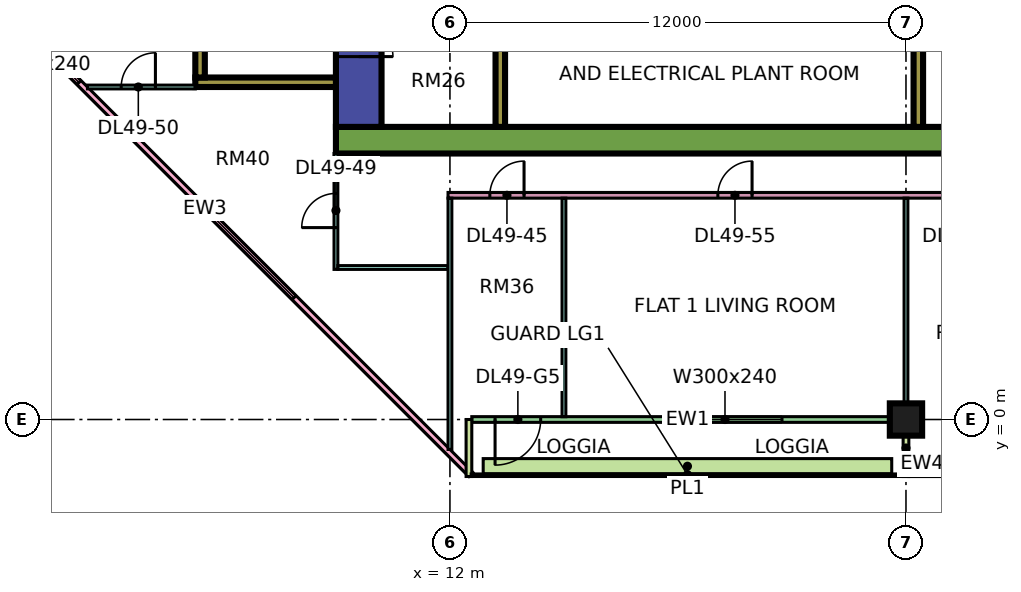
"""IFC4 building model, lengths in metres.
Left out: names, types, materials, properties, quantities, classifications, styles, units other than length and angle.
Written with IfcOpenShell. Run it as: python <this file> out.ifc"""

import sys

from ifc_helpers import new_model, si_unit, direction, frame, frame_2d, origin, origin_2d, place, context, subcontext, project, spatial, rectangle, extrude, element, fill, save


model = new_model("IFC4")
c1 = context("Model", 3, precision=1e-05, world=origin(), true_north=direction((0.0, 1.0)))
c2 = subcontext(c1, "Body", "Model", "MODEL_VIEW")
j1 = project(units=[si_unit("LENGTHUNIT", "METRE"), si_unit("PLANEANGLEUNIT", "RADIAN")], contexts=[c1])
p1 = place(None, origin())
s1 = spatial("IfcSite", under=j1, at=p1, CompositionType="ELEMENT")
p2 = place(p1, origin())
s2 = spatial("IfcBuilding", under=s1, at=p2, CompositionType="ELEMENT")
p3 = place(p2, frame((0.0, 0.0, 211.65)))
s3 = spatial("IfcBuildingStorey", under=s2, at=p3, CompositionType="ELEMENT", Elevation=211.65)
p4 = place(p3, frame((24.0, 0.0, 0.0), z_axis=(0.0, 0.0, 1.0), x_axis=(1.0, 0.0, 0.0)))
e1 = element("IfcColumn", 1, at=p4, inside=s3, PredefinedType="COLUMN", context=c2, shape_type="SweptSolid", body=[
    extrude(rectangle(XDim=0.85, YDim=0.85, at=origin_2d()), origin(), (0.0, 0.0, 1.0), 3.75),
])
p5 = place(p3, frame((9.0, 7.35, 0.0), z_axis=(0.0, 0.0, 1.0), x_axis=(1.0, 0.0, 0.0)))
e2 = element("IfcWall", 2, at=p5, inside=s3, PredefinedType="SHEAR", context=c2, shape_type="SweptSolid", body=[
    extrude(rectangle(XDim=25.0, YDim=0.7, at=frame_2d((12.5, 0.0))), origin(), (0.0, 0.0, 1.0), 3.75),
])
p6 = place(p3, frame((9.6, 7.7, 0.0), z_axis=(0.0, 0.0, 1.0), x_axis=(0.0, 1.0, 0.0)))
e3 = element("IfcWall", 3, at=p6, inside=s3, PredefinedType="SHEAR", context=c2, shape_type="SweptSolid", body=[
    extrude(rectangle(XDim=11.6, YDim=1.2, at=frame_2d((5.8, 0.0))), origin(), (0.0, 0.0, 1.0), 3.75),
])
p7 = place(p6, frame((4.175, 0.0, 0.0)))
e4 = element("IfcOpeningElement", 4, at=p7, cuts=e3, PredefinedType="OPENING", context=c2, shape_type="SweptSolid", body=[
    extrude(rectangle(XDim=1.1, YDim=2.2, at=frame_2d((0.55, 1.1))), frame((0.0, 0.61, 0.0), z_axis=(0.0, -1.0, 0.0), x_axis=(1.0, 0.0, 0.0)), (0.0, 0.0, 1.0), 1.22),
])
p8 = place(p6, frame((6.675, 0.0, 0.0)))
e5 = element("IfcOpeningElement", 5, at=p8, cuts=e3, PredefinedType="OPENING", context=c2, shape_type="SweptSolid", body=[
    extrude(rectangle(XDim=1.1, YDim=2.2, at=frame_2d((0.55, 1.1))), frame((0.0, 0.61, 0.0), z_axis=(0.0, -1.0, 0.0), x_axis=(1.0, 0.0, 0.0)), (0.0, 0.0, 1.0), 1.22),
])
p9 = place(p6, frame((9.55, 0.0, 0.0)))
e6 = element("IfcOpeningElement", 6, at=p9, cuts=e3, PredefinedType="OPENING", context=c2, shape_type="SweptSolid", body=[
    extrude(rectangle(XDim=1.1, YDim=2.2, at=frame_2d((0.55, 1.1))), frame((0.0, 0.61, 0.0), z_axis=(0.0, -1.0, 0.0), x_axis=(1.0, 0.0, 0.0)), (0.0, 0.0, 1.0), 1.22),
])
p10 = place(p6, frame((1.85, 0.0, 0.0)))
e7 = element("IfcOpeningElement", 7, at=p10, cuts=e3, PredefinedType="OPENING", context=c2, shape_type="SweptSolid", body=[
    extrude(rectangle(XDim=0.9, YDim=2.1, at=frame_2d((0.45, 1.05))), frame((0.0, 0.61, 0.0), z_axis=(0.0, -1.0, 0.0), x_axis=(1.0, 0.0, 0.0)), (0.0, 0.0, 1.0), 1.22),
])
p11 = place(p3, frame((13.325, 7.7, 0.0), z_axis=(0.0, 0.0, 1.0), x_axis=(0.0, 1.0, 0.0)))
e8 = element("IfcWall", 8, at=p11, inside=s3, PredefinedType="SHEAR", context=c2, shape_type="SweptSolid", body=[
    extrude(rectangle(XDim=11.6, YDim=0.25, at=frame_2d((5.8, 0.0))), origin(), (0.0, 0.0, 1.0), 3.75),
])
p12 = place(p3, frame((24.325, 7.7, 0.0), z_axis=(0.0, 0.0, 1.0), x_axis=(0.0, 1.0, 0.0)))
e9 = element("IfcWall", 9, at=p12, inside=s3, PredefinedType="SHEAR", context=c2, shape_type="SweptSolid", body=[
    extrude(rectangle(XDim=3.5, YDim=0.25, at=frame_2d((1.75, 0.0))), origin(), (0.0, 0.0, 1.0), 3.75),
])
p13 = place(p3, frame((5.3, 8.875, 0.0), z_axis=(0.0, 0.0, 1.0), x_axis=(1.0, 0.0, 0.0)))
e10 = element("IfcWall", 10, at=p13, inside=s3, PredefinedType="SHEAR", context=c2, shape_type="SweptSolid", body=[
    extrude(rectangle(XDim=3.7, YDim=0.25, at=frame_2d((1.85, 0.0))), origin(), (0.0, 0.0, 1.0), 3.75),
])
p14 = place(p3, frame((5.425, 9.0, 0.0), z_axis=(0.0, 0.0, 1.0), x_axis=(0.0, 1.0, 0.0)))
e11 = element("IfcWall", 11, at=p14, inside=s3, PredefinedType="SHEAR", context=c2, shape_type="SweptSolid", body=[
    extrude(rectangle(XDim=4.0, YDim=0.25, at=frame_2d((2.0, 0.0))), origin(), (0.0, 0.0, 1.0), 3.75),
])
p15 = place(p3, frame((-1.447, 12.553, 0.0), z_axis=(0.0, 0.0, 1.0), x_axis=(0.707106781187, -0.707106781187, 0.0)))
e12 = element("IfcWall", 12, at=p15, inside=s3, PredefinedType="SOLIDWALL", context=c2, shape_type="SweptSolid", body=[
    extrude(rectangle(XDim=19.799, YDim=0.15, at=frame_2d((9.899, 0.0))), origin(), (0.0, 0.0, 1.0), 3.35),
])
p16 = place(p15, frame((2.212, 0.0, 0.45)))
e13 = element("IfcOpeningElement", 13, at=p16, cuts=e12, PredefinedType="OPENING", context=c2, shape_type="SweptSolid", body=[
    extrude(rectangle(XDim=3.0, YDim=2.4, at=frame_2d((1.5, 1.2))), frame((0.0, 0.085, 0.0), z_axis=(0.0, -1.0, 0.0), x_axis=(1.0, 0.0, 0.0)), (0.0, 0.0, 1.0), 0.17),
])
p17 = place(p15, frame((10.216, 0.0, 0.45)))
e14 = element("IfcOpeningElement", 14, at=p17, cuts=e12, PredefinedType="OPENING", context=c2, shape_type="SweptSolid", body=[
    extrude(rectangle(XDim=3.0, YDim=2.4, at=frame_2d((1.5, 1.2))), frame((0.0, 0.085, 0.0), z_axis=(0.0, -1.0, 0.0), x_axis=(1.0, 0.0, 0.0)), (0.0, 0.0, 1.0), 0.17),
])
p18 = place(p3, frame((12.575, 0.0, 0.0), z_axis=(0.0, 0.0, 1.0), x_axis=(1.0, 0.0, 0.0)))
e15 = element("IfcWall", 15, at=p18, inside=s3, PredefinedType="SOLIDWALL", context=c2, shape_type="SweptSolid", body=[
    extrude(rectangle(XDim=11.35, YDim=0.15, at=frame_2d((5.675, 0.0))), origin(), (0.0, 0.0, 1.0), 3.35),
])
p19 = place(p18, frame((0.613, 0.0, 0.0)))
e16 = element("IfcOpeningElement", 16, at=p19, cuts=e15, PredefinedType="OPENING", context=c2, shape_type="SweptSolid", body=[
    extrude(rectangle(XDim=1.2, YDim=2.4, at=frame_2d((0.6, 1.2))), frame((0.0, 0.085, 0.0), z_axis=(0.0, -1.0, 0.0), x_axis=(1.0, 0.0, 0.0)), (0.0, 0.0, 1.0), 0.17),
])
p20 = place(p18, frame((5.163, 0.0, 0.45)))
e17 = element("IfcOpeningElement", 17, at=p20, cuts=e15, PredefinedType="OPENING", context=c2, shape_type="SweptSolid", body=[
    extrude(rectangle(XDim=3.0, YDim=2.4, at=frame_2d((1.5, 1.2))), frame((0.0, 0.085, 0.0), z_axis=(0.0, -1.0, 0.0), x_axis=(1.0, 0.0, 0.0)), (0.0, 0.0, 1.0), 0.17),
])
for number, where, z_axis, x_axis in (
    (18, (12.5, -1.5, 0.0), (0.0, 0.0, 1.0), (0.0, 1.0, 0.0)),
    (19, (24.0, -1.5, 0.0), (0.0, 0.0, 1.0), (0.0, 1.0, 0.0)),
):
    element("IfcWall", number, at=place(p3, frame(where, z_axis=z_axis, x_axis=x_axis)), inside=s3, PredefinedType="SOLIDWALL", context=c2, shape_type="SweptSolid", body=[
        extrude(rectangle(XDim=1.5, YDim=0.15, at=frame_2d((0.75, 0.0))), origin(), (0.0, 0.0, 1.0), 3.35),
    ])
p21 = place(p3, frame((24.075, -1.425, 0.0), z_axis=(0.0, 0.0, 1.0), x_axis=(1.0, 0.0, 0.0)))
e20 = element("IfcWall", 20, at=p21, inside=s3, PredefinedType="SOLIDWALL", context=c2, shape_type="SweptSolid", body=[
    extrude(rectangle(XDim=11.85, YDim=0.15, at=frame_2d((5.925, 0.0))), origin(), (0.0, 0.0, 1.0), 3.35),
])
p22 = place(p21, frame((0.562, 0.0, 0.45)))
e21 = element("IfcOpeningElement", 21, at=p22, cuts=e20, PredefinedType="OPENING", context=c2, shape_type="SweptSolid", body=[
    extrude(rectangle(XDim=1.8, YDim=2.4, at=frame_2d((0.9, 1.2))), frame((0.0, 0.085, 0.0), z_axis=(0.0, -1.0, 0.0), x_axis=(1.0, 0.0, 0.0)), (0.0, 0.0, 1.0), 0.17),
])
p23 = place(p21, frame((4.425, 0.0, 0.45)))
e22 = element("IfcOpeningElement", 22, at=p23, cuts=e20, PredefinedType="OPENING", context=c2, shape_type="SweptSolid", body=[
    extrude(rectangle(XDim=3.0, YDim=2.4, at=frame_2d((1.5, 1.2))), frame((0.0, 0.085, 0.0), z_axis=(0.0, -1.0, 0.0), x_axis=(1.0, 0.0, 0.0)), (0.0, 0.0, 1.0), 0.17),
])
p24 = place(p21, frame((9.488, 0.0, 0.45)))
e23 = element("IfcOpeningElement", 23, at=p24, cuts=e20, PredefinedType="OPENING", context=c2, shape_type="SweptSolid", body=[
    extrude(rectangle(XDim=1.8, YDim=2.4, at=frame_2d((0.9, 1.2))), frame((0.0, 0.085, 0.0), z_axis=(0.0, -1.0, 0.0), x_axis=(1.0, 0.0, 0.0)), (0.0, 0.0, 1.0), 0.17),
])
p25 = place(p3, frame((12.875, -1.229, 0.0), z_axis=(0.0, 0.0, 1.0), x_axis=(1.0, 0.0, 0.0)))
e24 = element("IfcWall", 24, at=p25, inside=s3, PredefinedType="SOLIDWALL", context=c2, shape_type="SweptSolid", body=[
    extrude(rectangle(XDim=10.75, YDim=0.4, at=frame_2d((5.375, 0.0))), origin(), (0.0, 0.0, 1.0), 0.7),
])
p26 = place(p3, frame((2.461, 8.75, 0.0), z_axis=(0.0, 0.0, 1.0), x_axis=(1.0, 0.0, 0.0)))
e25 = element("IfcWall", 25, at=p26, inside=s3, PredefinedType="PARTITIONING", context=c2, shape_type="SweptSolid", body=[
    extrude(rectangle(XDim=2.839, YDim=0.1, at=frame_2d((1.419, 0.0))), origin(), (0.0, 0.0, 1.0), 3.35),
])
p27 = place(p26, frame((0.889, 0.0, 0.0)))
e26 = element("IfcOpeningElement", 26, at=p27, cuts=e25, PredefinedType="OPENING", context=c2, shape_type="SweptSolid", body=[
    extrude(rectangle(XDim=0.9, YDim=2.1, at=frame_2d((0.45, 1.05))), frame((0.0, 0.06, 0.0), z_axis=(0.0, -1.0, 0.0), x_axis=(1.0, 0.0, 0.0)), (0.0, 0.0, 1.0), 0.12),
])
p28 = place(p3, frame((9.0, 3.95, 0.0), z_axis=(0.0, 0.0, 1.0), x_axis=(0.0, 1.0, 0.0)))
e27 = element("IfcWall", 27, at=p28, inside=s3, PredefinedType="PARTITIONING", context=c2, shape_type="SweptSolid", body=[
    extrude(rectangle(XDim=3.05, YDim=0.1, at=frame_2d((1.525, 0.0))), origin(), (0.0, 0.0, 1.0), 3.35),
])
p29 = place(p28, frame((1.1, 0.0, 0.0)))
e28 = element("IfcOpeningElement", 28, at=p29, cuts=e27, PredefinedType="OPENING", context=c2, shape_type="SweptSolid", body=[
    extrude(rectangle(XDim=0.9, YDim=2.1, at=frame_2d((0.45, 1.05))), frame((0.0, 0.06, 0.0), z_axis=(0.0, -1.0, 0.0), x_axis=(1.0, 0.0, 0.0)), (0.0, 0.0, 1.0), 0.12),
])
p30 = place(p3, frame((9.05, 4.0, 0.0), z_axis=(0.0, 0.0, 1.0), x_axis=(1.0, 0.0, 0.0)))
e29 = element("IfcWall", 29, at=p30, inside=s3, PredefinedType="PARTITIONING", context=c2, shape_type="SweptSolid", body=[
    extrude(rectangle(XDim=2.9, YDim=0.1, at=frame_2d((1.45, 0.0))), origin(), (0.0, 0.0, 1.0), 3.35),
])
p31 = place(p3, frame((11.95, 5.9, 0.0), z_axis=(0.0, 0.0, 1.0), x_axis=(1.0, 0.0, 0.0)))
e30 = element("IfcWall", 30, at=p31, inside=s3, PredefinedType="PARTITIONING", context=c2, shape_type="SweptSolid", body=[
    extrude(rectangle(XDim=21.1, YDim=0.15, at=frame_2d((10.55, 0.0))), origin(), (0.0, 0.0, 1.0), 3.35),
])
p32 = place(p31, frame((1.1, 0.0, 0.0)))
e31 = element("IfcOpeningElement", 31, at=p32, cuts=e30, PredefinedType="OPENING", context=c2, shape_type="SweptSolid", body=[
    extrude(rectangle(XDim=0.9, YDim=2.1, at=frame_2d((0.45, 1.05))), frame((0.0, 0.085, 0.0), z_axis=(0.0, -1.0, 0.0), x_axis=(1.0, 0.0, 0.0)), (0.0, 0.0, 1.0), 0.17),
])
p33 = place(p31, frame((13.1, 0.0, 0.0)))
e32 = element("IfcOpeningElement", 32, at=p33, cuts=e30, PredefinedType="OPENING", context=c2, shape_type="SweptSolid", body=[
    extrude(rectangle(XDim=0.9, YDim=2.1, at=frame_2d((0.45, 1.05))), frame((0.0, 0.085, 0.0), z_axis=(0.0, -1.0, 0.0), x_axis=(1.0, 0.0, 0.0)), (0.0, 0.0, 1.0), 0.17),
])
p34 = place(p31, frame((7.1, 0.0, 0.0)))
e33 = element("IfcOpeningElement", 33, at=p34, cuts=e30, PredefinedType="OPENING", context=c2, shape_type="SweptSolid", body=[
    extrude(rectangle(XDim=0.9, YDim=2.1, at=frame_2d((0.45, 1.05))), frame((0.0, 0.085, 0.0), z_axis=(0.0, -1.0, 0.0), x_axis=(1.0, 0.0, 0.0)), (0.0, 0.0, 1.0), 0.17),
])
p35 = place(p3, frame((12.0, -0.788, 0.0), z_axis=(0.0, 0.0, 1.0), x_axis=(0.0, 1.0, 0.0)))
e34 = element("IfcWall", 34, at=p35, inside=s3, PredefinedType="PARTITIONING", context=c2, shape_type="SweptSolid", body=[
    extrude(rectangle(XDim=6.613, YDim=0.1, at=frame_2d((3.306, 0.0))), origin(), (0.0, 0.0, 1.0), 3.35),
])
p36 = place(p3, frame((15.0, 0.074, 0.0), z_axis=(0.0, 0.0, 1.0), x_axis=(0.0, 1.0, 0.0)))
e35 = element("IfcWall", 35, at=p36, inside=s3, PredefinedType="PARTITIONING", context=c2, shape_type="SweptSolid", body=[
    extrude(rectangle(XDim=5.751, YDim=0.1, at=frame_2d((2.875, 0.0))), origin(), (0.0, 0.0, 1.0), 3.35),
])
p37 = place(p3, frame((24.0, 0.0, 0.0), z_axis=(0.0, 0.0, 1.0), x_axis=(0.0, 1.0, 0.0)))
e36 = element("IfcWall", 36, at=p37, inside=s3, PredefinedType="PARTITIONING", context=c2, shape_type="SweptSolid", body=[
    extrude(rectangle(XDim=5.825, YDim=0.1, at=frame_2d((2.913, 0.0))), origin(), (0.0, 0.0, 1.0), 3.35),
])
p38 = place(p16, origin())
e37 = element("IfcWindow", 37, at=p38, inside=s3, PartitioningType="SINGLE_PANEL", PredefinedType="WINDOW", context=c2, shape_type="SweptSolid", body=[
    extrude(rectangle(XDim=3.0, YDim=2.4, at=frame_2d((1.5, 1.2))), frame((0.0, 0.03, 0.0), z_axis=(0.0, -1.0, 0.0), x_axis=(1.0, 0.0, 0.0)), (0.0, 0.0, 1.0), 0.06),
])
fill(e13, e37)
p39 = place(p17, origin())
e38 = element("IfcWindow", 38, at=p39, inside=s3, PartitioningType="SINGLE_PANEL", PredefinedType="WINDOW", context=c2, shape_type="SweptSolid", body=[
    extrude(rectangle(XDim=3.0, YDim=2.4, at=frame_2d((1.5, 1.2))), frame((0.0, 0.03, 0.0), z_axis=(0.0, -1.0, 0.0), x_axis=(1.0, 0.0, 0.0)), (0.0, 0.0, 1.0), 0.06),
])
fill(e14, e38)
p40 = place(p19, frame((1.2, 0.0, 0.0), z_axis=(0.0, 0.0, 1.0), x_axis=(-1.0, 0.0, 0.0)))
e39 = element("IfcDoor", 39, at=p40, inside=s3, OperationType="DOUBLE_DOOR_SINGLE_SWING", PredefinedType="DOOR", context=c2, shape_type="SweptSolid", body=[
    extrude(rectangle(XDim=1.2, YDim=2.4, at=frame_2d((0.6, 1.2))), frame((0.0, 0.025, 0.0), z_axis=(0.0, -1.0, 0.0), x_axis=(1.0, 0.0, 0.0)), (0.0, 0.0, 1.0), 0.05),
])
fill(e16, e39)
p41 = place(p20, origin())
e40 = element("IfcWindow", 40, at=p41, inside=s3, PartitioningType="SINGLE_PANEL", PredefinedType="WINDOW", context=c2, shape_type="SweptSolid", body=[
    extrude(rectangle(XDim=3.0, YDim=2.4, at=frame_2d((1.5, 1.2))), frame((0.0, 0.03, 0.0), z_axis=(0.0, -1.0, 0.0), x_axis=(1.0, 0.0, 0.0)), (0.0, 0.0, 1.0), 0.06),
])
fill(e17, e40)
p42 = place(p22, origin())
e41 = element("IfcWindow", 41, at=p42, inside=s3, PartitioningType="SINGLE_PANEL", PredefinedType="WINDOW", context=c2, shape_type="SweptSolid", body=[
    extrude(rectangle(XDim=1.8, YDim=2.4, at=frame_2d((0.9, 1.2))), frame((0.0, 0.03, 0.0), z_axis=(0.0, -1.0, 0.0), x_axis=(1.0, 0.0, 0.0)), (0.0, 0.0, 1.0), 0.06),
])
fill(e21, e41)
p43 = place(p10, frame((0.9, 0.0, 0.0), z_axis=(0.0, 0.0, 1.0), x_axis=(-1.0, 0.0, 0.0)))
e42 = element("IfcDoor", 42, at=p43, inside=s3, OperationType="SINGLE_SWING_LEFT", PredefinedType="DOOR", context=c2, shape_type="SweptSolid", body=[
    extrude(rectangle(XDim=0.9, YDim=2.1, at=frame_2d((0.45, 1.05))), frame((0.0, 0.025, 0.0), z_axis=(0.0, -1.0, 0.0), x_axis=(1.0, 0.0, 0.0)), (0.0, 0.0, 1.0), 0.05),
])
fill(e7, e42)
p44 = place(p32, frame((0.9, 0.0, 0.0), z_axis=(0.0, 0.0, 1.0), x_axis=(-1.0, 0.0, 0.0)))
e43 = element("IfcDoor", 43, at=p44, inside=s3, OperationType="SINGLE_SWING_RIGHT", PredefinedType="DOOR", context=c2, shape_type="SweptSolid", body=[
    extrude(rectangle(XDim=0.9, YDim=2.1, at=frame_2d((0.45, 1.05))), frame((0.0, 0.025, 0.0), z_axis=(0.0, -1.0, 0.0), x_axis=(1.0, 0.0, 0.0)), (0.0, 0.0, 1.0), 0.05),
])
fill(e31, e43)
p45 = place(p29, origin())
e44 = element("IfcDoor", 44, at=p45, inside=s3, OperationType="SINGLE_SWING_LEFT", PredefinedType="DOOR", context=c2, shape_type="SweptSolid", body=[
    extrude(rectangle(XDim=0.9, YDim=2.1, at=frame_2d((0.45, 1.05))), frame((0.0, 0.025, 0.0), z_axis=(0.0, -1.0, 0.0), x_axis=(1.0, 0.0, 0.0)), (0.0, 0.0, 1.0), 0.05),
])
fill(e28, e44)
p46 = place(p27, frame((0.9, 0.0, 0.0), z_axis=(0.0, 0.0, 1.0), x_axis=(-1.0, 0.0, 0.0)))
e45 = element("IfcDoor", 45, at=p46, inside=s3, OperationType="SINGLE_SWING_RIGHT", PredefinedType="DOOR", context=c2, shape_type="SweptSolid", body=[
    extrude(rectangle(XDim=0.9, YDim=2.1, at=frame_2d((0.45, 1.05))), frame((0.0, 0.025, 0.0), z_axis=(0.0, -1.0, 0.0), x_axis=(1.0, 0.0, 0.0)), (0.0, 0.0, 1.0), 0.05),
])
fill(e26, e45)
p47 = place(p34, frame((0.9, 0.0, 0.0), z_axis=(0.0, 0.0, 1.0), x_axis=(-1.0, 0.0, 0.0)))
e46 = element("IfcDoor", 46, at=p47, inside=s3, OperationType="SINGLE_SWING_RIGHT", PredefinedType="DOOR", context=c2, shape_type="SweptSolid", body=[
    extrude(rectangle(XDim=0.9, YDim=2.1, at=frame_2d((0.45, 1.05))), frame((0.0, 0.025, 0.0), z_axis=(0.0, -1.0, 0.0), x_axis=(1.0, 0.0, 0.0)), (0.0, 0.0, 1.0), 0.05),
])
fill(e33, e46)
save(model, sys.argv[1])
